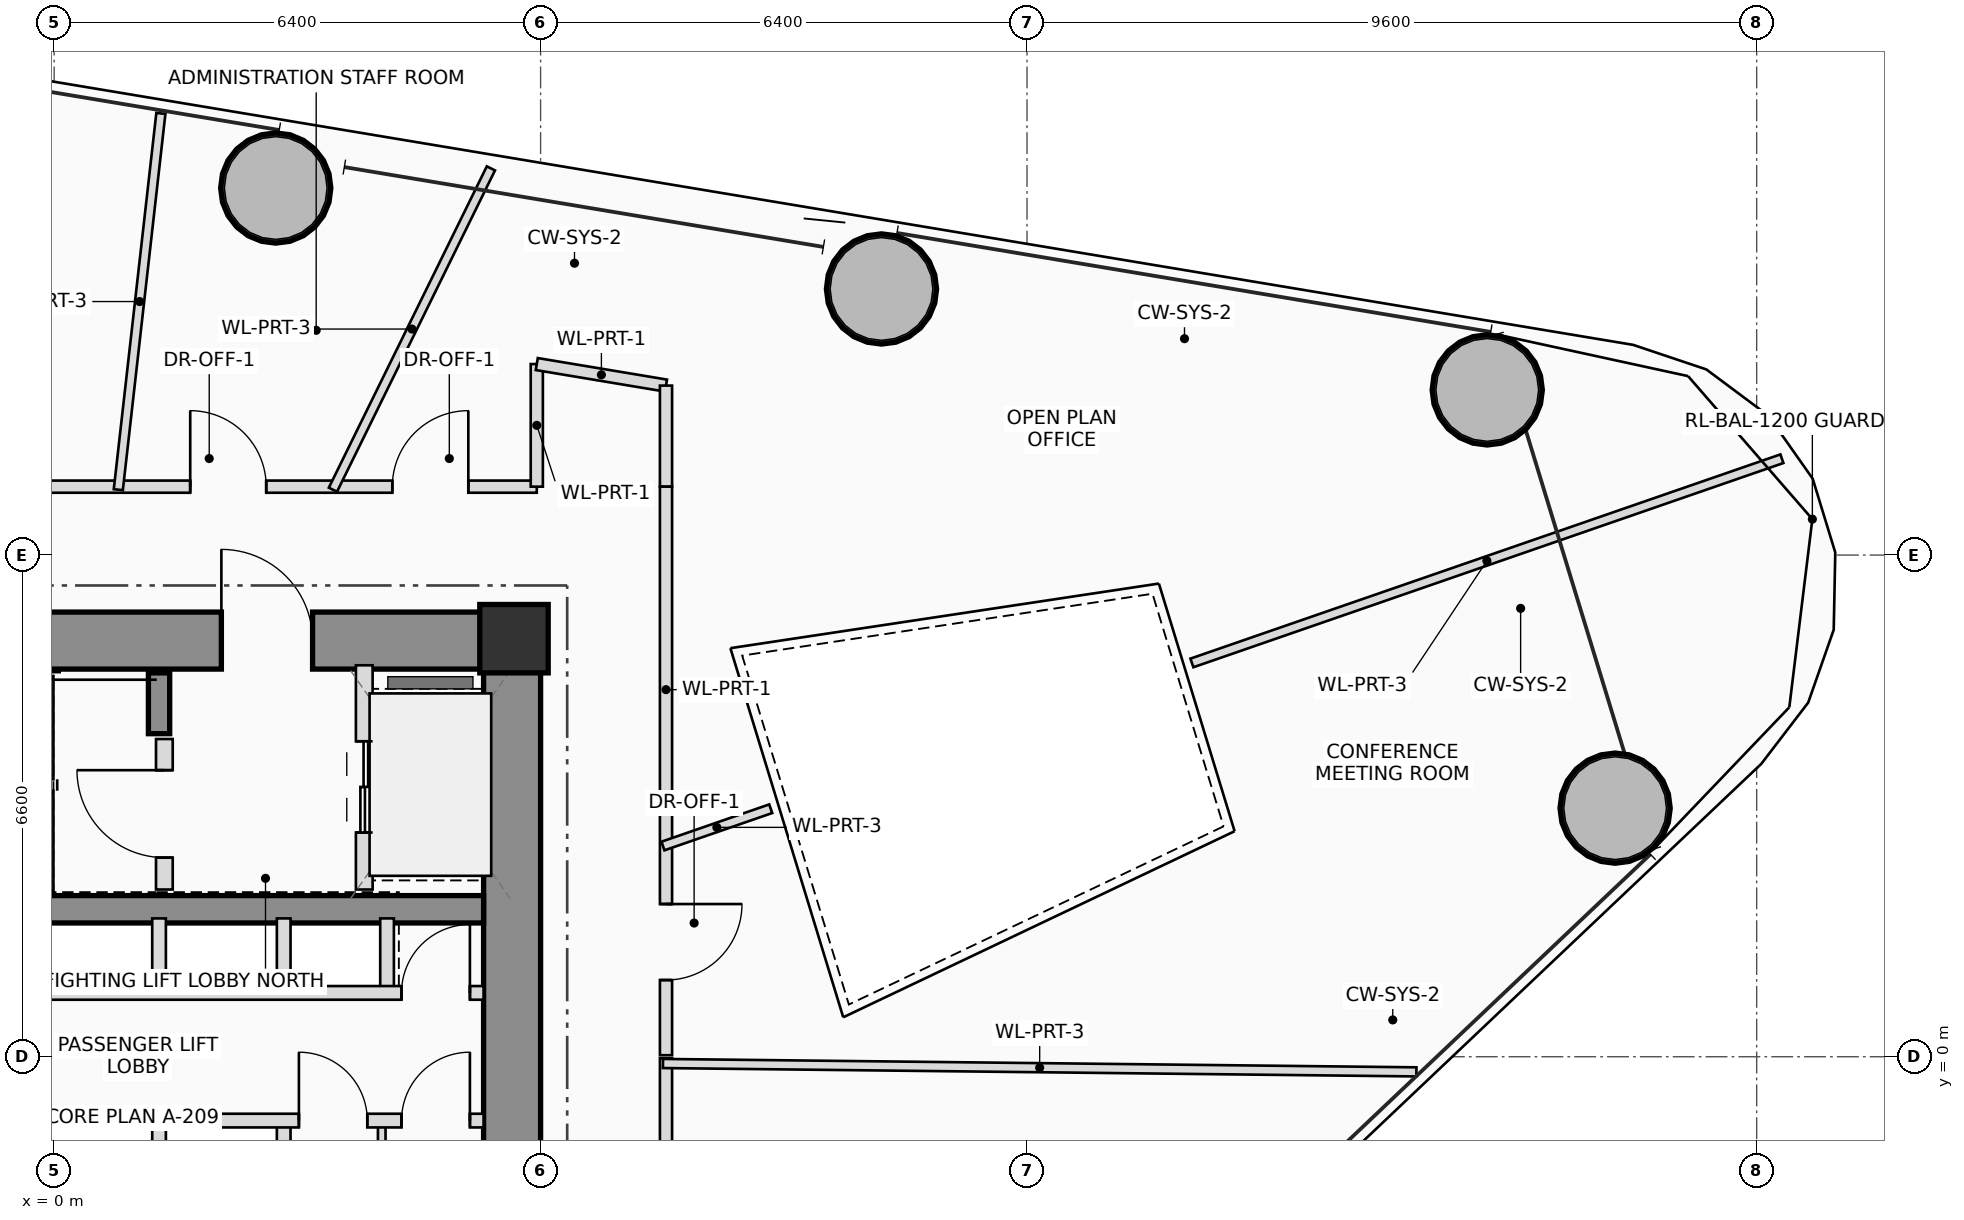
"""IFC4 building model, lengths in metres.
Left out: names, types, materials, properties, quantities, classifications, styles, units other than length and angle.
Written with IfcOpenShell. Run it as: python <this file> out.ifc"""

import sys

from ifc_helpers import new_model, si_unit, direction, frame, frame_2d, origin, origin_2d, place, context, subcontext, project, spatial, rectangle, hollow_circle, extrude, source, transform, mapped, element, fill, save


model = new_model("IFC4")
c1 = context("Model", 3, precision=1e-05, world=origin(), true_north=direction((0.0, 1.0)))
c2 = subcontext(c1, "Body", "Model", "MODEL_VIEW")
j1 = project(units=[si_unit("LENGTHUNIT", "METRE"), si_unit("PLANEANGLEUNIT", "RADIAN")], contexts=[c1])
p1 = place(None, origin())
s1 = spatial("IfcSite", under=j1, at=p1, CompositionType="ELEMENT")
p2 = place(p1, origin())
s2 = spatial("IfcBuilding", under=s1, at=p2, CompositionType="ELEMENT")
p3 = place(p2, frame((0.0, 0.0, 97.4)))
s3 = spatial("IfcBuildingStorey", under=s2, at=p3, CompositionType="ELEMENT", Elevation=97.4)
m1 = source(origin(), c2, "Body", "SweptSolid", [
    extrude(rectangle(XDim=0.9, YDim=0.9, at=origin_2d()), origin(), (0.0, 0.0, 1.0), 3.75),
])
p4 = place(p3, frame((6.05, 5.5, 0.0), z_axis=(0.0, 0.0, 1.0), x_axis=(1.0, 0.0, 0.0)))
e1 = element("IfcColumn", 1, at=p4, inside=s3, PredefinedType="COLUMN", context=c2, shape_type="MappedRepresentation", body=[
    mapped(m1, transform((0.0, 0.0, 0.0), scale=1.0)),
])
p5 = place(p3, frame((-6.4, 5.475, 0.0), z_axis=(0.0, 0.0, 1.0), x_axis=(1.0, 0.0, 0.0)))
e2 = element("IfcWall", 2, at=p5, inside=s3, PredefinedType="SHEAR", context=c2, shape_type="SweptSolid", body=[
    extrude(rectangle(XDim=12.8, YDim=0.75, at=frame_2d((6.4, 0.0))), origin(), (0.0, 0.0, 1.0), 3.75),
])
p6 = place(p5, frame((8.6, 0.0, 0.0)))
e3 = element("IfcOpeningElement", 3, at=p6, cuts=e2, PredefinedType="OPENING", context=c2, shape_type="SweptSolid", body=[
    extrude(rectangle(XDim=1.2, YDim=2.2, at=frame_2d((0.6, 1.1))), frame((0.0, 0.385, 0.0), z_axis=(0.0, -1.0, 0.0), x_axis=(1.0, 0.0, 0.0)), (0.0, 0.0, 1.0), 0.77),
])
p7 = place(p3, frame((6.025, -5.1, 0.0), z_axis=(0.0, 0.0, 1.0), x_axis=(0.0, 1.0, 0.0)))
e4 = element("IfcWall", 4, at=p7, inside=s3, PredefinedType="SHEAR", context=c2, shape_type="SweptSolid", body=[
    extrude(rectangle(XDim=10.2, YDim=0.75, at=frame_2d((5.1, 0.0))), origin(), (0.0, 0.0, 1.0), 3.75),
])
p8 = place(p3, frame((-5.65, 1.94, 0.0), z_axis=(0.0, 0.0, 1.0), x_axis=(1.0, 0.0, 0.0)))
e5 = element("IfcWall", 5, at=p8, inside=s3, PredefinedType="SHEAR", context=c2, shape_type="SweptSolid", body=[
    extrude(rectangle(XDim=11.3, YDim=0.36, at=frame_2d((5.65, 0.0))), origin(), (0.0, 0.0, 1.0), 3.75),
])
p9 = place(p3, frame((1.38, 4.25, 0.0), z_axis=(0.0, 0.0, 1.0), x_axis=(0.0, 1.0, 0.0)))
e6 = element("IfcWall", 6, at=p9, inside=s3, PredefinedType="SHEAR", context=c2, shape_type="SweptSolid", body=[
    extrude(rectangle(XDim=0.8, YDim=0.28, at=frame_2d((0.4, 0.0))), origin(), (0.0, 0.0, 1.0), 3.75),
])
m2 = source(origin(), c2, "Body", "SweptSolid", [
    extrude(hollow_circle(Radius=0.725, WallThickness=0.05, at=origin_2d()), origin(), (0.0, 0.0, 1.0), 3.75),
])
for number, where, z_axis, x_axis in (
    (7, (20.538, 3.271, 0.0), (0.0, 0.0, 1.0), (1.0, 0.0, 0.0)),
    (8, (18.855, 8.773, 0.0), (0.0, 0.0, 1.0), (1.0, 0.0, 0.0)),
    (9, (10.885, 10.101, 0.0), (0.0, 0.0, 1.0), (1.0, 0.0, 0.0)),
    (10, (2.915, 11.429, 0.0), (0.0, 0.0, 1.0), (1.0, 0.0, 0.0)),
):
    element("IfcColumn", number, at=place(p3, frame(where, z_axis=z_axis, x_axis=x_axis)), inside=s3, PredefinedType="COLUMN", context=c2, shape_type="MappedRepresentation", body=[
        mapped(m2, transform((0.0, 0.0, 0.0), scale=1.0)),
    ])
p10 = place(p3, frame((1.45, 2.2, 0.0), z_axis=(0.0, 0.0, 1.0), x_axis=(0.0, 1.0, 0.0)))
e11 = element("IfcWall", 11, at=p10, inside=s3, PredefinedType="PLUMBINGWALL", context=c2, shape_type="SweptSolid", body=[
    extrude(rectangle(XDim=1.98, YDim=0.22, at=frame_2d((0.99, 0.0))), origin(), (0.0, 0.0, 1.0), 3.545),
])
p11 = place(p10, frame((0.42, 0.0, 0.0)))
e12 = element("IfcOpeningElement", 12, at=p11, cuts=e11, PredefinedType="OPENING", context=c2, shape_type="SweptSolid", body=[
    extrude(rectangle(XDim=1.15, YDim=2.15, at=frame_2d((0.575, 1.075))), frame((0.0, 0.12, 0.0), z_axis=(0.0, -1.0, 0.0), x_axis=(1.0, 0.0, 0.0)), (0.0, 0.0, 1.0), 0.24),
])
p12 = place(p3, frame((4.08, 2.2, 0.0), z_axis=(0.0, 0.0, 1.0), x_axis=(0.0, 1.0, 0.0)))
e13 = element("IfcWall", 13, at=p12, inside=s3, PredefinedType="PLUMBINGWALL", context=c2, shape_type="SweptSolid", body=[
    extrude(rectangle(XDim=2.95, YDim=0.22, at=frame_2d((1.475, 0.0))), origin(), (0.0, 0.0, 1.0), 3.545),
])
p13 = place(p12, frame((0.75, 0.0, 0.0)))
e14 = element("IfcOpeningElement", 14, at=p13, cuts=e13, PredefinedType="OPENING", context=c2, shape_type="SweptSolid", body=[
    extrude(rectangle(XDim=1.2, YDim=2.25, at=frame_2d((0.6, 1.125))), frame((0.0, 0.12, 0.0), z_axis=(0.0, -1.0, 0.0), x_axis=(1.0, 0.0, 0.0)), (0.0, 0.0, 1.0), 0.24),
])
for number, where, z_axis, x_axis in (
    (15, (1.38, 0.84, 0.0), (0.0, 0.0, 1.0), (0.0, 1.0, 0.0)),
    (16, (1.38, -1.82, 0.0), (0.0, 0.0, 1.0), (0.0, 1.0, 0.0)),
    (17, (3.02, 0.84, 0.0), (0.0, 0.0, 1.0), (0.0, 1.0, 0.0)),
    (18, (4.38, 0.84, 0.0), (0.0, 0.0, 1.0), (0.0, 1.0, 0.0)),
    (19, (3.02, -1.82, 0.0), (0.0, 0.0, 1.0), (0.0, 1.0, 0.0)),
):
    element("IfcWall", number, at=place(p3, frame(where, z_axis=z_axis, x_axis=x_axis)), inside=s3, PredefinedType="PLUMBINGWALL", context=c2, shape_type="SweptSolid", body=[
        extrude(rectangle(XDim=0.98, YDim=0.18, at=frame_2d((0.49, 0.0))), origin(), (0.0, 0.0, 1.0), 3.545),
    ])
p14 = place(p3, frame((4.31, -1.82, 0.0), z_axis=(0.0, 0.0, 1.0), x_axis=(0.0, 1.0, 0.0)))
e20 = element("IfcWall", 20, at=p14, inside=s3, PredefinedType="PARTITIONING", context=c2, shape_type="SweptSolid", body=[
    extrude(rectangle(XDim=0.98, YDim=0.1, at=frame_2d((0.49, 0.0))), origin(), (0.0, 0.0, 1.0), 3.545),
])
p15 = place(p3, frame((-5.68, 0.84, 0.0), z_axis=(0.0, 0.0, 1.0), x_axis=(1.0, 0.0, 0.0)))
e21 = element("IfcWall", 21, at=p15, inside=s3, PredefinedType="PLUMBINGWALL", context=c2, shape_type="SweptSolid", body=[
    extrude(rectangle(XDim=11.33, YDim=0.18, at=frame_2d((5.665, 0.0))), origin(), (0.0, 0.0, 1.0), 3.545),
])
p16 = place(p15, frame((0.43, 0.0, 0.0)))
e22 = element("IfcOpeningElement", 22, at=p16, cuts=e21, PredefinedType="OPENING", context=c2, shape_type="SweptSolid", body=[
    extrude(rectangle(XDim=1.1, YDim=2.2, at=frame_2d((0.55, 1.1))), frame((0.0, 0.1, 0.0), z_axis=(0.0, -1.0, 0.0), x_axis=(1.0, 0.0, 0.0)), (0.0, 0.0, 1.0), 0.2),
])
p17 = place(p15, frame((2.13, 0.0, 0.0)))
e23 = element("IfcOpeningElement", 23, at=p17, cuts=e21, PredefinedType="OPENING", context=c2, shape_type="SweptSolid", body=[
    extrude(rectangle(XDim=1.1, YDim=2.2, at=frame_2d((0.55, 1.1))), frame((0.0, 0.1, 0.0), z_axis=(0.0, -1.0, 0.0), x_axis=(1.0, 0.0, 0.0)), (0.0, 0.0, 1.0), 0.2),
])
p18 = place(p15, frame((10.25, 0.0, 0.0)))
e24 = element("IfcOpeningElement", 24, at=p18, cuts=e21, PredefinedType="OPENING", context=c2, shape_type="SweptSolid", body=[
    extrude(rectangle(XDim=0.9, YDim=2.05, at=frame_2d((0.45, 1.025))), frame((0.0, 0.1, 0.0), z_axis=(0.0, -1.0, 0.0), x_axis=(1.0, 0.0, 0.0)), (0.0, 0.0, 1.0), 0.2),
])
p19 = place(p3, frame((-5.68, -0.84, 0.0), z_axis=(0.0, 0.0, 1.0), x_axis=(1.0, 0.0, 0.0)))
e25 = element("IfcWall", 25, at=p19, inside=s3, PredefinedType="PLUMBINGWALL", context=c2, shape_type="SweptSolid", body=[
    extrude(rectangle(XDim=11.33, YDim=0.18, at=frame_2d((5.665, 0.0))), origin(), (0.0, 0.0, 1.0), 3.545),
])
p20 = place(p19, frame((0.43, 0.0, 0.0)))
e26 = element("IfcOpeningElement", 26, at=p20, cuts=e25, PredefinedType="OPENING", context=c2, shape_type="SweptSolid", body=[
    extrude(rectangle(XDim=1.1, YDim=2.2, at=frame_2d((0.55, 1.1))), frame((0.0, 0.1, 0.0), z_axis=(0.0, -1.0, 0.0), x_axis=(1.0, 0.0, 0.0)), (0.0, 0.0, 1.0), 0.2),
])
p21 = place(p19, frame((2.13, 0.0, 0.0)))
e27 = element("IfcOpeningElement", 27, at=p21, cuts=e25, PredefinedType="OPENING", context=c2, shape_type="SweptSolid", body=[
    extrude(rectangle(XDim=1.1, YDim=2.2, at=frame_2d((0.55, 1.1))), frame((0.0, 0.1, 0.0), z_axis=(0.0, -1.0, 0.0), x_axis=(1.0, 0.0, 0.0)), (0.0, 0.0, 1.0), 0.2),
])
p22 = place(p19, frame((8.9, 0.0, 0.0)))
e28 = element("IfcOpeningElement", 28, at=p22, cuts=e25, PredefinedType="OPENING", context=c2, shape_type="SweptSolid", body=[
    extrude(rectangle(XDim=0.9, YDim=2.05, at=frame_2d((0.45, 1.025))), frame((0.0, 0.1, 0.0), z_axis=(0.0, -1.0, 0.0), x_axis=(1.0, 0.0, 0.0)), (0.0, 0.0, 1.0), 0.2),
])
p23 = place(p19, frame((10.25, 0.0, 0.0)))
e29 = element("IfcOpeningElement", 29, at=p23, cuts=e25, PredefinedType="OPENING", context=c2, shape_type="SweptSolid", body=[
    extrude(rectangle(XDim=0.9, YDim=2.05, at=frame_2d((0.45, 1.025))), frame((0.0, 0.1, 0.0), z_axis=(0.0, -1.0, 0.0), x_axis=(1.0, 0.0, 0.0)), (0.0, 0.0, 1.0), 0.2),
])
p24 = place(p3, frame((-6.35, 7.5, 0.0), z_axis=(0.0, 0.0, 1.0), x_axis=(1.0, 0.0, 0.0)))
e30 = element("IfcWall", 30, at=p24, inside=s3, PredefinedType="PARTITIONING", context=c2, shape_type="SweptSolid", body=[
    extrude(rectangle(XDim=12.7, YDim=0.16, at=frame_2d((6.35, 0.0))), origin(), (0.0, 0.0, 1.0), 2.85),
])
p25 = place(p24, frame((8.14, 0.0, 0.0)))
e31 = element("IfcOpeningElement", 31, at=p25, cuts=e30, PredefinedType="OPENING", context=c2, shape_type="SweptSolid", body=[
    extrude(rectangle(XDim=1.0, YDim=2.25, at=frame_2d((0.5, 1.125))), frame((0.0, 0.09, 0.0), z_axis=(0.0, -1.0, 0.0), x_axis=(1.0, 0.0, 0.0)), (0.0, 0.0, 1.0), 0.18),
])
p26 = place(p24, frame((10.799, 0.0, 0.0)))
e32 = element("IfcOpeningElement", 32, at=p26, cuts=e30, PredefinedType="OPENING", context=c2, shape_type="SweptSolid", body=[
    extrude(rectangle(XDim=1.0, YDim=2.25, at=frame_2d((0.5, 1.125))), frame((0.0, 0.09, 0.0), z_axis=(0.0, -1.0, 0.0), x_axis=(1.0, 0.0, 0.0)), (0.0, 0.0, 1.0), 0.18),
])
p27 = place(p3, frame((6.35, 7.5, 0.0), z_axis=(0.0, 0.0, 1.0), x_axis=(0.0, 1.0, 0.0)))
e33 = element("IfcWall", 33, at=p27, inside=s3, PredefinedType="PARTITIONING", context=c2, shape_type="SweptSolid", body=[
    extrude(rectangle(XDim=1.613, YDim=0.16, at=frame_2d((0.807, 0.0))), origin(), (0.0, 0.0, 1.0), 3.05),
])
p28 = place(p3, frame((6.35, 9.113, 0.0), z_axis=(0.0, 0.0, 1.0), x_axis=(0.986405407683, -0.164330069354, 0.0)))
e34 = element("IfcWall", 34, at=p28, inside=s3, PredefinedType="PARTITIONING", context=c2, shape_type="SweptSolid", body=[
    extrude(rectangle(XDim=1.723, YDim=0.16, at=frame_2d((0.862, 0.0))), origin(), (0.0, 0.0, 1.0), 3.2),
])
p29 = place(p3, frame((8.05, 8.83, 0.0), z_axis=(0.0, 0.0, 1.0), x_axis=(0.0, -1.0, 0.0)))
e35 = element("IfcWall", 35, at=p29, inside=s3, PredefinedType="PARTITIONING", context=c2, shape_type="SweptSolid", body=[
    extrude(rectangle(XDim=1.33, YDim=0.16, at=frame_2d((0.665, 0.0))), origin(), (0.0, 0.0, 1.0), 2.85),
])
p30 = place(p3, frame((8.05, 7.5, 0.0), z_axis=(0.0, 0.0, 1.0), x_axis=(0.0, -1.0, 0.0)))
e36 = element("IfcWall", 36, at=p30, inside=s3, PredefinedType="PARTITIONING", context=c2, shape_type="SweptSolid", body=[
    extrude(rectangle(XDim=7.48, YDim=0.16, at=frame_2d((3.74, 0.0))), origin(), (0.0, 0.0, 1.0), 2.85),
])
p31 = place(p30, frame((5.491, 0.0, 0.0)))
e37 = element("IfcOpeningElement", 37, at=p31, cuts=e36, PredefinedType="OPENING", context=c2, shape_type="SweptSolid", body=[
    extrude(rectangle(XDim=1.0, YDim=2.25, at=frame_2d((0.5, 1.125))), frame((0.0, 0.09, 0.0), z_axis=(0.0, -1.0, 0.0), x_axis=(1.0, 0.0, 0.0)), (0.0, 0.0, 1.0), 0.18),
])
p32 = place(p3, frame((8.05, -0.02, 0.0), z_axis=(0.0, 0.0, 1.0), x_axis=(0.0, -1.0, 0.0)))
e38 = element("IfcWall", 38, at=p32, inside=s3, PredefinedType="PARTITIONING", context=c2, shape_type="SweptSolid", body=[
    extrude(rectangle(XDim=6.174, YDim=0.16, at=frame_2d((3.087, 0.0))), origin(), (0.0, 0.0, 1.0), 2.85),
])
p33 = place(p32, frame((2.587, 0.0, 0.0)))
e39 = element("IfcOpeningElement", 39, at=p33, cuts=e38, PredefinedType="OPENING", context=c2, shape_type="SweptSolid", body=[
    extrude(rectangle(XDim=1.0, YDim=2.25, at=frame_2d((0.5, 1.125))), frame((0.0, 0.09, 0.0), z_axis=(0.0, -1.0, 0.0), x_axis=(1.0, 0.0, 0.0)), (0.0, 0.0, 1.0), 0.18),
])
p34 = place(p3, frame((8.01, -0.089, 0.0), z_axis=(0.0, 0.0, 1.0), x_axis=(0.999938319872, -0.011106594972, 0.0)))
e40 = element("IfcWall", 40, at=p34, inside=s3, PredefinedType="PARTITIONING", context=c2, shape_type="SweptSolid", body=[
    extrude(rectangle(XDim=9.914, YDim=0.12, at=frame_2d((4.957, 0.0))), origin(), (0.0, 0.0, 1.0), 2.85),
])
p35 = place(p3, frame((8.01, 2.772, 0.0), z_axis=(0.0, 0.0, 1.0), x_axis=(0.945009284385, 0.327043502344, 0.0)))
e41 = element("IfcWall", 41, at=p35, inside=s3, PredefinedType="PARTITIONING", context=c2, shape_type="SweptSolid", body=[
    extrude(rectangle(XDim=1.5, YDim=0.12, at=frame_2d((0.75, 0.0))), origin(), (0.0, 0.0, 1.0), 3.21),
])
p36 = place(p3, frame((14.969, 5.181, 0.0), z_axis=(0.0, 0.0, 1.0), x_axis=(0.945001266043, 0.327066670843, 0.0)))
e42 = element("IfcWall", 42, at=p36, inside=s3, PredefinedType="PARTITIONING", context=c2, shape_type="SweptSolid", body=[
    extrude(rectangle(XDim=8.215, YDim=0.12, at=frame_2d((4.107, 0.0))), origin(), (0.0, 0.0, 1.0), 3.01),
])
p37 = place(p3, frame((3.668, 7.46, 0.0), z_axis=(0.0, 0.0, 1.0), x_axis=(0.441212238914, 0.897402785951, 0.0)))
e43 = element("IfcWall", 43, at=p37, inside=s3, PredefinedType="PARTITIONING", context=c2, shape_type="SweptSolid", body=[
    extrude(rectangle(XDim=4.711, YDim=0.12, at=frame_2d((2.355, 0.0))), origin(), (0.0, 0.0, 1.0), 2.85),
])
p38 = place(p3, frame((0.844, 7.46, 0.0), z_axis=(0.0, 0.0, 1.0), x_axis=(0.112405035284, 0.99366247189, 0.0)))
e44 = element("IfcWall", 44, at=p38, inside=s3, PredefinedType="PARTITIONING", context=c2, shape_type="SweptSolid", body=[
    extrude(rectangle(XDim=4.982, YDim=0.12, at=frame_2d((2.491, 0.0))), origin(), (0.0, 0.0, 1.0), 3.01),
])
p39 = place(p6, origin())
e45 = element("IfcDoor", 45, at=p39, inside=s3, OperationType="SINGLE_SWING_LEFT", PredefinedType="DOOR", context=c2, shape_type="SweptSolid", body=[
    extrude(rectangle(XDim=1.2, YDim=2.2, at=frame_2d((0.6, 1.1))), frame((0.0, 0.025, 0.0), z_axis=(0.0, -1.0, 0.0), x_axis=(1.0, 0.0, 0.0)), (0.0, 0.0, 1.0), 0.05),
])
fill(e3, e45)
p40 = place(p11, origin())
e46 = element("IfcDoor", 46, at=p40, inside=s3, OperationType="SINGLE_SWING_RIGHT", PredefinedType="DOOR", context=c2, shape_type="SweptSolid", body=[
    extrude(rectangle(XDim=1.15, YDim=2.15, at=frame_2d((0.575, 1.075))), frame((0.0, 0.025, 0.0), z_axis=(0.0, -1.0, 0.0), x_axis=(1.0, 0.0, 0.0)), (0.0, 0.0, 1.0), 0.05),
])
fill(e12, e46)
p41 = place(p13, origin())
e47 = element("IfcDoor", 47, at=p41, inside=s3, OperationType="DOUBLE_DOOR_SLIDING", PredefinedType="DOOR", context=c2, shape_type="SweptSolid", body=[
    extrude(rectangle(XDim=1.2, YDim=2.25, at=frame_2d((0.6, 1.125))), frame((0.0, 0.025, 0.0), z_axis=(0.0, -1.0, 0.0), x_axis=(1.0, 0.0, 0.0)), (0.0, 0.0, 1.0), 0.05),
])
fill(e14, e47)
p42 = place(p18, origin())
e48 = element("IfcDoor", 48, at=p42, inside=s3, OperationType="SINGLE_SWING_RIGHT", PredefinedType="DOOR", context=c2, shape_type="SweptSolid", body=[
    extrude(rectangle(XDim=0.9, YDim=2.05, at=frame_2d((0.45, 1.025))), frame((0.0, 0.025, 0.0), z_axis=(0.0, -1.0, 0.0), x_axis=(1.0, 0.0, 0.0)), (0.0, 0.0, 1.0), 0.05),
])
fill(e24, e48)
p43 = place(p22, origin())
e49 = element("IfcDoor", 49, at=p43, inside=s3, OperationType="SINGLE_SWING_LEFT", PredefinedType="DOOR", context=c2, shape_type="SweptSolid", body=[
    extrude(rectangle(XDim=0.9, YDim=2.05, at=frame_2d((0.45, 1.025))), frame((0.0, 0.025, 0.0), z_axis=(0.0, -1.0, 0.0), x_axis=(1.0, 0.0, 0.0)), (0.0, 0.0, 1.0), 0.05),
])
fill(e28, e49)
p44 = place(p23, origin())
e50 = element("IfcDoor", 50, at=p44, inside=s3, OperationType="SINGLE_SWING_RIGHT", PredefinedType="DOOR", context=c2, shape_type="SweptSolid", body=[
    extrude(rectangle(XDim=0.9, YDim=2.05, at=frame_2d((0.45, 1.025))), frame((0.0, 0.025, 0.0), z_axis=(0.0, -1.0, 0.0), x_axis=(1.0, 0.0, 0.0)), (0.0, 0.0, 1.0), 0.05),
])
fill(e29, e50)
p45 = place(p25, origin())
e51 = element("IfcDoor", 51, at=p45, inside=s3, OperationType="SINGLE_SWING_LEFT", PredefinedType="DOOR", context=c2, shape_type="SweptSolid", body=[
    extrude(rectangle(XDim=1.0, YDim=2.25, at=frame_2d((0.5, 1.125))), frame((0.0, 0.025, 0.0), z_axis=(0.0, -1.0, 0.0), x_axis=(1.0, 0.0, 0.0)), (0.0, 0.0, 1.0), 0.05),
])
fill(e31, e51)
p46 = place(p26, origin())
e52 = element("IfcDoor", 52, at=p46, inside=s3, OperationType="SINGLE_SWING_RIGHT", PredefinedType="DOOR", context=c2, shape_type="SweptSolid", body=[
    extrude(rectangle(XDim=1.0, YDim=2.25, at=frame_2d((0.5, 1.125))), frame((0.0, 0.025, 0.0), z_axis=(0.0, -1.0, 0.0), x_axis=(1.0, 0.0, 0.0)), (0.0, 0.0, 1.0), 0.05),
])
fill(e32, e52)
p47 = place(p31, origin())
e53 = element("IfcDoor", 53, at=p47, inside=s3, OperationType="SINGLE_SWING_LEFT", PredefinedType="DOOR", context=c2, shape_type="SweptSolid", body=[
    extrude(rectangle(XDim=1.0, YDim=2.25, at=frame_2d((0.5, 1.125))), frame((0.0, 0.025, 0.0), z_axis=(0.0, -1.0, 0.0), x_axis=(1.0, 0.0, 0.0)), (0.0, 0.0, 1.0), 0.05),
])
fill(e37, e53)
save(model, sys.argv[1])
